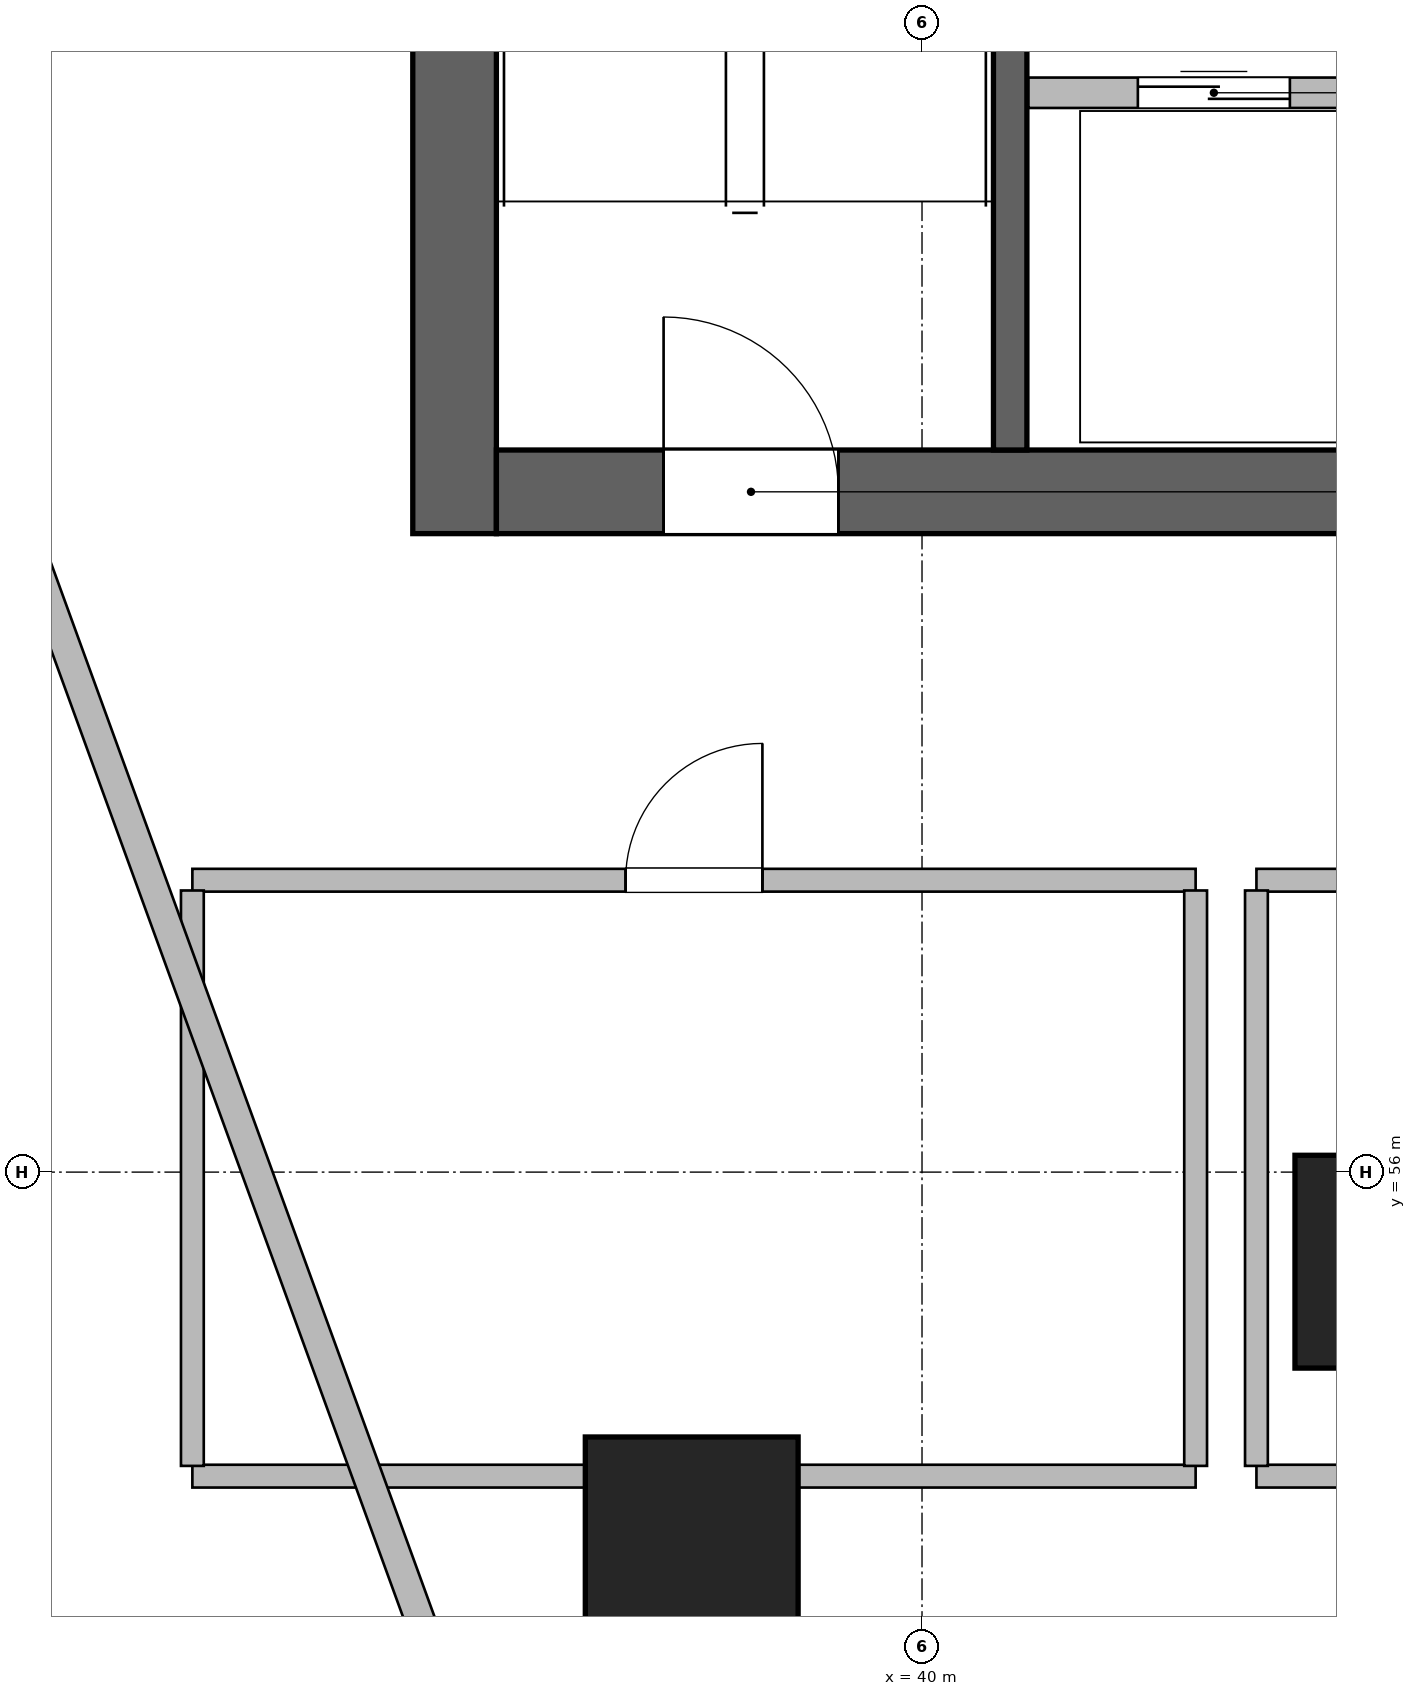
"""IFC4 building model, lengths in metres.
Left out: names, types, materials, properties, quantities, classifications, styles, units other than length and angle.
Written with IfcOpenShell. Run it as: python <this file> out.ifc"""

import sys

from ifc_helpers import new_model, si_unit, direction, frame, frame_2d, origin, origin_2d, place, context, subcontext, project, spatial, rectangle, circle, extrude, source, transform, mapped, element, fill, save


model = new_model("IFC4")
c1 = context("Model", 3, precision=1e-05, world=origin(), true_north=direction((0.0, 1.0)))
c2 = subcontext(c1, "Body", "Model", "MODEL_VIEW")
j1 = project(units=[si_unit("LENGTHUNIT", "METRE"), si_unit("PLANEANGLEUNIT", "RADIAN")], contexts=[c1])
p1 = place(None, origin())
s1 = spatial("IfcSite", under=j1, at=p1, CompositionType="ELEMENT")
p2 = place(p1, origin())
s2 = spatial("IfcBuilding", under=s1, at=p2, CompositionType="ELEMENT")
p3 = place(p2, frame((0.0, 0.0, 42.6)))
s3 = spatial("IfcBuildingStorey", under=s2, at=p3, CompositionType="ELEMENT", Elevation=42.6)
m1 = source(origin(), c2, "Body", "SweptSolid", [
    extrude(rectangle(XDim=12.0, YDim=0.55, at=frame_2d((6.0, 0.0))), origin(), (0.0, 0.0, 1.0), 3.6),
])
p4 = place(p3, frame((36.925, 60.2, 0.0), z_axis=(0.0, 0.0, 1.0), x_axis=(0.0, 1.0, 0.0)))
e1 = element("IfcWall", 1, at=p4, inside=s3, PredefinedType="SHEAR", context=c2, shape_type="MappedRepresentation", body=[
    mapped(m1, transform((0.0, 0.0, 0.0), scale=1.0)),
])
m2 = source(origin(), c2, "Body", "SweptSolid", [
    extrude(rectangle(XDim=21.6, YDim=0.55, at=frame_2d((10.8, 0.0))), origin(), (0.0, 0.0, 1.0), 3.6),
])
p5 = place(p3, frame((37.2, 60.475, 0.0), z_axis=(0.0, 0.0, 1.0), x_axis=(1.0, 0.0, 0.0)))
e2 = element("IfcWall", 2, at=p5, inside=s3, PredefinedType="SHEAR", context=c2, shape_type="MappedRepresentation", body=[
    mapped(m2, transform((0.0, 0.0, 0.0), scale=1.0)),
])
p6 = place(p5, frame((1.1, 0.0, 0.0)))
e3 = element("IfcOpeningElement", 3, at=p6, cuts=e2, PredefinedType="OPENING", context=c2, shape_type="SweptSolid", body=[
    extrude(rectangle(XDim=1.15, YDim=2.15, at=frame_2d((0.575, 1.075))), frame((0.0, 0.285, 0.0), z_axis=(0.0, -1.0, 0.0), x_axis=(1.0, 0.0, 0.0)), (0.0, 0.0, 1.0), 0.57),
])
p7 = place(p5, frame((19.5, 0.0, 0.0)))
e4 = element("IfcOpeningElement", 4, at=p7, cuts=e2, PredefinedType="OPENING", context=c2, shape_type="SweptSolid", body=[
    extrude(rectangle(XDim=0.9, YDim=2.1, at=frame_2d((0.45, 1.05))), frame((0.0, 0.285, 0.0), z_axis=(0.0, -1.0, 0.0), x_axis=(1.0, 0.0, 0.0)), (0.0, 0.0, 1.0), 0.57),
])
p8 = place(p5, frame((12.02, 0.0, 0.0)))
e5 = element("IfcOpeningElement", 5, at=p8, cuts=e2, PredefinedType="OPENING", context=c2, shape_type="SweptSolid", body=[
    extrude(rectangle(XDim=1.6, YDim=2.15, at=frame_2d((0.8, 1.075))), frame((0.0, 0.285, 0.0), z_axis=(0.0, -1.0, 0.0), x_axis=(1.0, 0.0, 0.0)), (0.0, 0.0, 1.0), 0.57),
])
m3 = source(origin(), c2, "Body", "SweptSolid", [
    extrude(rectangle(XDim=10.9, YDim=0.22, at=frame_2d((5.45, 0.0))), origin(), (0.0, 0.0, 1.0), 3.6),
])
p9 = place(p3, frame((40.58, 60.75, 0.0), z_axis=(0.0, 0.0, 1.0), x_axis=(0.0, 1.0, 0.0)))
e6 = element("IfcWall", 6, at=p9, inside=s3, PredefinedType="SHEAR", context=c2, shape_type="MappedRepresentation", body=[
    mapped(m3, transform((0.0, 0.0, 0.0), scale=1.0)),
])
m4 = source(origin(), c2, "Body", "SweptSolid", [
    extrude(circle(Radius=0.7, at=origin_2d()), origin(), (0.0, 0.0, 1.0), 3.6),
])
for number, where, z_axis, x_axis in (
    (7, (38.485, 53.558, 0.0), (0.0, 0.0, 1.0), (-0.289, 0.957, 0.0)),
    (8, (43.154, 55.411, 0.0), (0.0, 0.0, 1.0), (-0.143, 0.99, 0.0)),
):
    element("IfcColumn", number, at=place(p3, frame(where, z_axis=z_axis, x_axis=x_axis)), inside=s3, PredefinedType="COLUMN", context=c2, shape_type="MappedRepresentation", body=[
        mapped(m4, transform((0.0, 0.0, 0.0), scale=1.0)),
    ])
m5 = source(origin(), c2, "Body", "SweptSolid", [
    extrude(rectangle(XDim=8.02, YDim=0.2, at=frame_2d((4.01, 0.0))), origin(), (0.0, 0.0, 1.0), 3.36),
])
p10 = place(p3, frame((40.7, 63.1, 0.0), z_axis=(0.0, 0.0, 1.0), x_axis=(1.0, 0.0, 0.0)))
e9 = element("IfcWall", 9, at=p10, inside=s3, PredefinedType="SOLIDWALL", context=c2, shape_type="MappedRepresentation", body=[
    mapped(m5, transform((0.0, 0.0, 0.0), scale=1.0)),
])
p11 = place(p10, frame((0.72, 0.0, 0.0)))
e10 = element("IfcOpeningElement", 10, at=p11, cuts=e9, PredefinedType="OPENING", context=c2, shape_type="SweptSolid", body=[
    extrude(rectangle(XDim=1.0, YDim=2.15, at=frame_2d((0.5, 1.075))), frame((0.0, 0.11, 0.0), z_axis=(0.0, -1.0, 0.0), x_axis=(1.0, 0.0, 0.0)), (0.0, 0.0, 1.0), 0.22),
])
p12 = place(p10, frame((2.62, 0.0, 0.0)))
e11 = element("IfcOpeningElement", 11, at=p12, cuts=e9, PredefinedType="OPENING", context=c2, shape_type="SweptSolid", body=[
    extrude(rectangle(XDim=1.0, YDim=2.15, at=frame_2d((0.5, 1.075))), frame((0.0, 0.11, 0.0), z_axis=(0.0, -1.0, 0.0), x_axis=(1.0, 0.0, 0.0)), (0.0, 0.0, 1.0), 0.22),
])
p13 = place(p10, frame((4.55, 0.0, 0.0)))
e12 = element("IfcOpeningElement", 12, at=p13, cuts=e9, PredefinedType="OPENING", context=c2, shape_type="SweptSolid", body=[
    extrude(rectangle(XDim=1.0, YDim=2.15, at=frame_2d((0.5, 1.075))), frame((0.0, 0.11, 0.0), z_axis=(0.0, -1.0, 0.0), x_axis=(1.0, 0.0, 0.0)), (0.0, 0.0, 1.0), 0.22),
])
p14 = place(p10, frame((6.55, 0.0, 0.0)))
e13 = element("IfcOpeningElement", 13, at=p14, cuts=e9, PredefinedType="OPENING", context=c2, shape_type="SweptSolid", body=[
    extrude(rectangle(XDim=1.0, YDim=2.15, at=frame_2d((0.5, 1.075))), frame((0.0, 0.11, 0.0), z_axis=(0.0, -1.0, 0.0), x_axis=(1.0, 0.0, 0.0)), (0.0, 0.0, 1.0), 0.22),
])
m6 = source(origin(), c2, "Body", "SweptSolid", [
    extrude(rectangle(XDim=6.6, YDim=0.15, at=frame_2d((3.3, 0.0))), origin(), (0.0, 0.0, 1.0), 2.803),
])
p15 = place(p3, frame((35.2, 54.0, 0.0), z_axis=(0.0, 0.0, 1.0), x_axis=(1.0, 0.0, 0.0)))
e14 = element("IfcWall", 14, at=p15, inside=s3, PredefinedType="PARTITIONING", context=c2, shape_type="MappedRepresentation", body=[
    mapped(m6, transform((0.0, 0.0, 0.0), scale=1.0)),
])
m7 = source(origin(), c2, "Body", "SweptSolid", [
    extrude(rectangle(XDim=6.6, YDim=0.15, at=frame_2d((3.3, 0.0))), origin(), (0.0, 0.0, 1.0), 3.36),
])
p16 = place(p3, frame((35.2, 57.92, 0.0), z_axis=(0.0, 0.0, 1.0), x_axis=(1.0, 0.0, 0.0)))
e15 = element("IfcWall", 15, at=p16, inside=s3, PredefinedType="PARTITIONING", context=c2, shape_type="MappedRepresentation", body=[
    mapped(m7, transform((0.0, 0.0, 0.0), scale=1.0)),
])
p17 = place(p16, frame((2.85, 0.0, 0.0)))
e16 = element("IfcOpeningElement", 16, at=p17, cuts=e15, PredefinedType="OPENING", context=c2, shape_type="SweptSolid", body=[
    extrude(rectangle(XDim=0.9, YDim=2.1, at=frame_2d((0.45, 1.05))), frame((0.0, 0.085, 0.0), z_axis=(0.0, -1.0, 0.0), x_axis=(1.0, 0.0, 0.0)), (0.0, 0.0, 1.0), 0.17),
])
m8 = source(origin(), c2, "Body", "SweptSolid", [
    extrude(rectangle(XDim=3.785, YDim=0.15, at=frame_2d((1.893, 0.0))), origin(), (0.0, 0.0, 1.0), 3.36),
])
for number, where, z_axis, x_axis in (
    (17, (35.2, 54.067, 0.0), (0.0, 0.0, 1.0), (0.0, 1.0, 0.0)),
    (18, (41.8, 54.067, 0.0), (0.0, 0.0, 1.0), (0.0, 1.0, 0.0)),
):
    element("IfcWall", number, at=place(p3, frame(where, z_axis=z_axis, x_axis=x_axis)), inside=s3, PredefinedType="PARTITIONING", context=c2, shape_type="MappedRepresentation", body=[
        mapped(m8, transform((0.0, 0.0, 0.0), scale=1.0)),
    ])
m9 = source(origin(), c2, "Body", "SweptSolid", [
    extrude(rectangle(XDim=11.6, YDim=0.15, at=frame_2d((5.8, 0.0))), origin(), (0.0, 0.0, 1.0), 3.36),
])
p18 = place(p3, frame((42.2, 54.0, 0.0), z_axis=(0.0, 0.0, 1.0), x_axis=(1.0, 0.0, 0.0)))
e19 = element("IfcWall", 19, at=p18, inside=s3, PredefinedType="PARTITIONING", context=c2, shape_type="MappedRepresentation", body=[
    mapped(m9, transform((0.0, 0.0, 0.0), scale=1.0)),
])
p19 = place(p3, frame((42.2, 57.92, 0.0), z_axis=(0.0, 0.0, 1.0), x_axis=(1.0, 0.0, 0.0)))
e20 = element("IfcWall", 20, at=p19, inside=s3, PredefinedType="PARTITIONING", context=c2, shape_type="MappedRepresentation", body=[
    mapped(m9, transform((0.0, 0.0, 0.0), scale=1.0)),
])
p20 = place(p19, frame((6.9, 0.0, 0.0)))
e21 = element("IfcOpeningElement", 21, at=p20, cuts=e20, PredefinedType="OPENING", context=c2, shape_type="SweptSolid", body=[
    extrude(rectangle(XDim=1.1, YDim=2.15, at=frame_2d((0.55, 1.075))), frame((0.0, 0.085, 0.0), z_axis=(0.0, -1.0, 0.0), x_axis=(1.0, 0.0, 0.0)), (0.0, 0.0, 1.0), 0.17),
])
p21 = place(p3, frame((42.2, 54.067, 0.0), z_axis=(0.0, 0.0, 1.0), x_axis=(0.0, 1.0, 0.0)))
e22 = element("IfcWall", 22, at=p21, inside=s3, PredefinedType="PARTITIONING", context=c2, shape_type="MappedRepresentation", body=[
    mapped(m8, transform((0.0, 0.0, 0.0), scale=1.0)),
])
m10 = source(origin(), c2, "Body", "SweptSolid", [
    extrude(rectangle(XDim=11.844, YDim=0.195, at=frame_2d((5.922, 0.0))), origin(), (0.0, 0.0, 1.0), 2.644),
])
p22 = place(p3, frame((35.727, 46.848, 0.0), z_axis=(0.0, 0.0, 1.0), x_axis=(-0.442871152218, 0.896585267854, 0.0)))
e23 = element("IfcWall", 23, at=p22, inside=s3, PredefinedType="PARTITIONING", context=c2, shape_type="MappedRepresentation", body=[
    mapped(m10, transform((0.0, 0.0, 0.0), scale=1.0)),
])
m11 = source(origin(), c2, "Body", "SweptSolid", [
    extrude(rectangle(XDim=12.196, YDim=0.195, at=frame_2d((6.098, 0.0))), origin(), (0.0, 0.0, 1.0), 3.36),
])
p23 = place(p3, frame((38.258, 48.766, 0.0), z_axis=(0.0, 0.0, 1.0), x_axis=(-0.342022711534, 0.939691686031, 0.0)))
e24 = element("IfcWall", 24, at=p23, inside=s3, PredefinedType="PARTITIONING", context=c2, shape_type="MappedRepresentation", body=[
    mapped(m11, transform((0.0, 0.0, 0.0), scale=1.0)),
])
m12 = source(origin(), c2, "Body", "SweptSolid", [
    extrude(rectangle(XDim=1.15, YDim=2.15, at=frame_2d((0.575, 1.075))), frame((0.0, 0.025, 0.0), z_axis=(0.0, -1.0, 0.0), x_axis=(1.0, 0.0, 0.0)), (0.0, 0.0, 1.0), 0.05),
])
p24 = place(p6, origin())
e25 = element("IfcDoor", 25, at=p24, inside=s3, OperationType="SINGLE_SWING_LEFT", PredefinedType="DOOR", context=c2, shape_type="MappedRepresentation", body=[
    mapped(m12, transform((0.0, 0.0, 0.0), scale=1.0)),
])
fill(e3, e25)
m13 = source(origin(), c2, "Body", "SweptSolid", [
    extrude(rectangle(XDim=1.0, YDim=2.15, at=frame_2d((0.5, 1.075))), frame((0.0, 0.025, 0.0), z_axis=(0.0, -1.0, 0.0), x_axis=(1.0, 0.0, 0.0)), (0.0, 0.0, 1.0), 0.05),
])
p25 = place(p11, origin())
e26 = element("IfcDoor", 26, at=p25, inside=s3, OperationType="DOUBLE_DOOR_SLIDING", PredefinedType="DOOR", context=c2, shape_type="MappedRepresentation", body=[
    mapped(m13, transform((0.0, 0.0, 0.0), scale=1.0)),
])
fill(e10, e26)
m14 = source(origin(), c2, "Body", "SweptSolid", [
    extrude(rectangle(XDim=0.9, YDim=2.1, at=frame_2d((0.45, 1.05))), frame((0.0, 0.025, 0.0), z_axis=(0.0, -1.0, 0.0), x_axis=(1.0, 0.0, 0.0)), (0.0, 0.0, 1.0), 0.05),
])
p26 = place(p17, origin())
e27 = element("IfcDoor", 27, at=p26, inside=s3, OperationType="SINGLE_SWING_RIGHT", PredefinedType="DOOR", context=c2, shape_type="MappedRepresentation", body=[
    mapped(m14, transform((0.0, 0.0, 0.0), scale=1.0)),
])
fill(e16, e27)
save(model, sys.argv[1])
